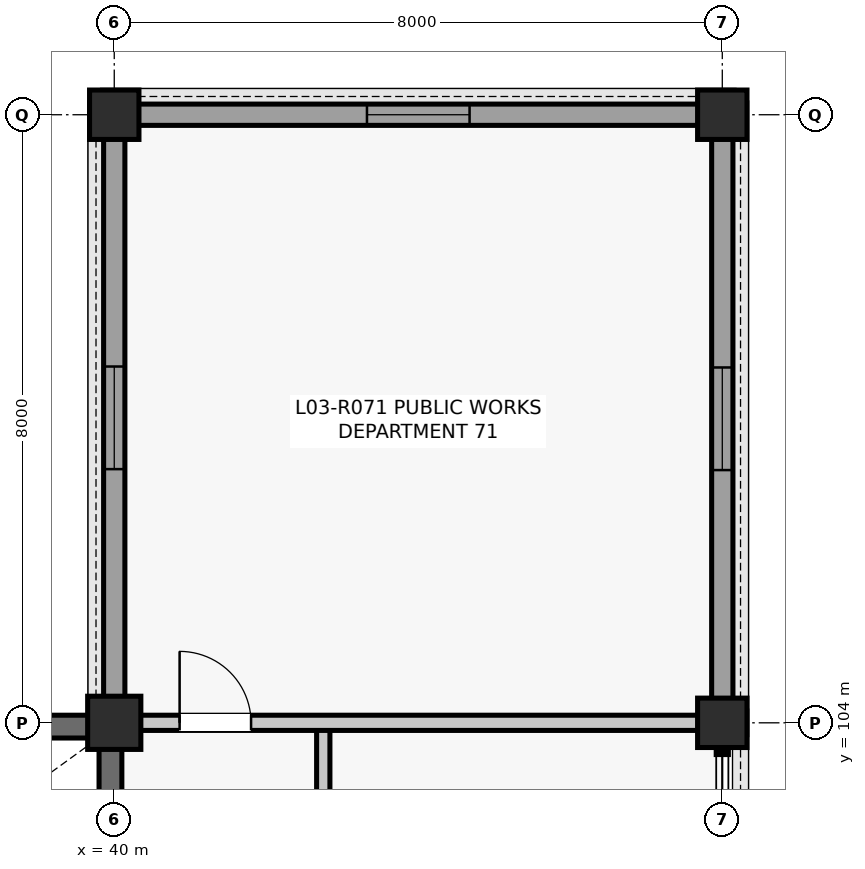
"""IFC4 building model, lengths in metres.
Left out: names, types, materials, properties, quantities, classifications, styles, units other than length and angle.
Written with IfcOpenShell. Run it as: python <this file> out.ifc"""

import sys

from ifc_helpers import new_model, si_unit, direction, frame, frame_2d, origin, origin_2d, place, context, subcontext, project, spatial, rectangle, extrude, element, fill, save


model = new_model("IFC4")
c1 = context("Model", 3, precision=1e-05, world=origin(), true_north=direction((0.0, 1.0)))
c2 = subcontext(c1, "Body", "Model", "MODEL_VIEW")
j1 = project(units=[si_unit("LENGTHUNIT", "METRE"), si_unit("PLANEANGLEUNIT", "RADIAN")], contexts=[c1])
p1 = place(None, origin())
s1 = spatial("IfcSite", under=j1, at=p1, CompositionType="ELEMENT")
p2 = place(p1, origin())
s2 = spatial("IfcBuilding", under=s1, at=p2, CompositionType="ELEMENT")
p3 = place(p2, frame((0.0, 0.0, 13.86)))
s3 = spatial("IfcBuildingStorey", under=s2, at=p3, CompositionType="ELEMENT", Elevation=13.86)
p4 = place(p3, frame((40.0, 104.0, 0.0), z_axis=(0.0, 0.0, 1.0), x_axis=(1.0, 0.0, 0.0)))
e1 = element("IfcColumn", 1, at=p4, inside=s3, PredefinedType="COLUMN", context=c2, shape_type="SweptSolid", body=[
    extrude(rectangle(XDim=0.7, YDim=0.7, at=origin_2d()), origin(), (0.0, 0.0, 1.0), 3.96),
])
for number, where, z_axis, x_axis in (
    (2, (40.0, 112.0, 0.0), (0.0, 0.0, 1.0), (1.0, 0.0, 0.0)),
    (3, (48.0, 104.0, 0.0), (0.0, 0.0, 1.0), (1.0, 0.0, 0.0)),
    (4, (48.0, 112.0, 0.0), (0.0, 0.0, 1.0), (1.0, 0.0, 0.0)),
):
    element("IfcColumn", number, at=place(p3, frame(where, z_axis=z_axis, x_axis=x_axis)), inside=s3, PredefinedType="COLUMN", context=c2, shape_type="SweptSolid", body=[
        extrude(rectangle(XDim=0.65, YDim=0.65, at=origin_2d()), origin(), (0.0, 0.0, 1.0), 3.96),
    ])
p5 = place(p3, frame((40.31, 112.0, 0.0), z_axis=(0.0, 0.0, 1.0), x_axis=(1.0, 0.0, 0.0)))
e5 = element("IfcWall", 5, at=p5, inside=s3, PredefinedType="SOLIDWALL", context=c2, shape_type="SweptSolid", body=[
    extrude(rectangle(XDim=7.38, YDim=0.28, at=frame_2d((3.69, 0.0))), origin(), (0.0, 0.0, 1.0), 3.304),
])
p6 = place(p5, frame((3.015, 0.0, 0.9)))
e6 = element("IfcOpeningElement", 6, at=p6, cuts=e5, PredefinedType="OPENING", context=c2, shape_type="SweptSolid", body=[
    extrude(rectangle(XDim=1.35, YDim=1.9, at=frame_2d((0.675, 0.95))), frame((0.0, 0.15, 0.0), z_axis=(0.0, -1.0, 0.0), x_axis=(1.0, 0.0, 0.0)), (0.0, 0.0, 1.0), 0.3),
])
p7 = place(p3, frame((40.0, 104.335, 0.0), z_axis=(0.0, 0.0, 1.0), x_axis=(0.0, 1.0, 0.0)))
e7 = element("IfcWall", 7, at=p7, inside=s3, PredefinedType="SOLIDWALL", context=c2, shape_type="SweptSolid", body=[
    extrude(rectangle(XDim=7.355, YDim=0.28, at=frame_2d((3.677, 0.0))), origin(), (0.0, 0.0, 1.0), 3.364),
])
p8 = place(p7, frame((3.002, 0.0, 0.9)))
e8 = element("IfcOpeningElement", 8, at=p8, cuts=e7, PredefinedType="OPENING", context=c2, shape_type="SweptSolid", body=[
    extrude(rectangle(XDim=1.35, YDim=1.9, at=frame_2d((0.675, 0.95))), frame((0.0, 0.15, 0.0), z_axis=(0.0, -1.0, 0.0), x_axis=(1.0, 0.0, 0.0)), (0.0, 0.0, 1.0), 0.3),
])
p9 = place(p3, frame((48.0, 104.31, 0.0), z_axis=(0.0, 0.0, 1.0), x_axis=(0.0, 1.0, 0.0)))
e9 = element("IfcWall", 9, at=p9, inside=s3, PredefinedType="SOLIDWALL", context=c2, shape_type="SweptSolid", body=[
    extrude(rectangle(XDim=7.38, YDim=0.28, at=frame_2d((3.69, 0.0))), origin(), (0.0, 0.0, 1.0), 3.304),
])
p10 = place(p9, frame((3.015, 0.0, 0.9)))
e10 = element("IfcOpeningElement", 10, at=p10, cuts=e9, PredefinedType="OPENING", context=c2, shape_type="SweptSolid", body=[
    extrude(rectangle(XDim=1.35, YDim=1.9, at=frame_2d((0.675, 0.95))), frame((0.0, 0.15, 0.0), z_axis=(0.0, -1.0, 0.0), x_axis=(1.0, 0.0, 0.0)), (0.0, 0.0, 1.0), 0.3),
])
for number, where, z_axis, x_axis in (
    (11, (32.24, 103.95, 0.0), (0.0, 0.0, 1.0), (1.0, 0.0, 0.0)),
    (12, (39.95, 96.24, 0.0), (0.0, 0.0, 1.0), (0.0, 1.0, 0.0)),
):
    element("IfcWall", number, at=place(p3, frame(where, z_axis=z_axis, x_axis=x_axis)), inside=s3, PredefinedType="SHEAR", context=c2, shape_type="SweptSolid", body=[
        extrude(rectangle(XDim=7.52, YDim=0.3, at=frame_2d((3.76, 0.0))), origin(), (0.0, 0.0, 1.0), 3.725),
    ])
p11 = place(p3, frame((42.75, 96.02, 0.0), z_axis=(0.0, 0.0, 1.0), x_axis=(0.0, 1.0, 0.0)))
e13 = element("IfcWall", 13, at=p11, inside=s3, PredefinedType="PARTITIONING", context=c2, shape_type="SweptSolid", body=[
    extrude(rectangle(XDim=7.96, YDim=0.175, at=frame_2d((3.98, 0.0))), origin(), (0.0, 0.0, 1.0), 3.241),
])
p12 = place(p11, frame((3.48, 0.0, 0.0)))
e14 = element("IfcOpeningElement", 14, at=p12, cuts=e13, PredefinedType="OPENING", context=c2, shape_type="SweptSolid", body=[
    extrude(rectangle(XDim=1.0, YDim=2.15, at=frame_2d((0.5, 1.075))), frame((0.0, 0.097, 0.0), z_axis=(0.0, -1.0, 0.0), x_axis=(1.0, 0.0, 0.0)), (0.0, 0.0, 1.0), 0.195),
])
p13 = place(p3, frame((40.34, 104.0, 0.0), z_axis=(0.0, 0.0, 1.0), x_axis=(1.0, 0.0, 0.0)))
e15 = element("IfcWall", 15, at=p13, inside=s3, PredefinedType="PARTITIONING", context=c2, shape_type="SweptSolid", body=[
    extrude(rectangle(XDim=7.345, YDim=0.2, at=frame_2d((3.672, 0.0))), origin(), (0.0, 0.0, 1.0), 3.241),
])
p14 = place(p13, frame((0.52, 0.0, 0.0)))
e16 = element("IfcOpeningElement", 16, at=p14, cuts=e15, PredefinedType="OPENING", context=c2, shape_type="SweptSolid", body=[
    extrude(rectangle(XDim=0.94, YDim=2.12, at=frame_2d((0.47, 1.06))), frame((0.0, 0.11, 0.0), z_axis=(0.0, -1.0, 0.0), x_axis=(1.0, 0.0, 0.0)), (0.0, 0.0, 1.0), 0.22),
])
p15 = place(p6, origin())
e17 = element("IfcWindow", 17, at=p15, inside=s3, PartitioningType="SINGLE_PANEL", PredefinedType="WINDOW", context=c2, shape_type="SweptSolid", body=[
    extrude(rectangle(XDim=1.35, YDim=1.9, at=frame_2d((0.675, 0.95))), frame((0.0, 0.03, 0.0), z_axis=(0.0, -1.0, 0.0), x_axis=(1.0, 0.0, 0.0)), (0.0, 0.0, 1.0), 0.06),
])
fill(e6, e17)
p16 = place(p8, origin())
e18 = element("IfcWindow", 18, at=p16, inside=s3, PartitioningType="SINGLE_PANEL", PredefinedType="WINDOW", context=c2, shape_type="SweptSolid", body=[
    extrude(rectangle(XDim=1.35, YDim=1.9, at=frame_2d((0.675, 0.95))), frame((0.0, 0.03, 0.0), z_axis=(0.0, -1.0, 0.0), x_axis=(1.0, 0.0, 0.0)), (0.0, 0.0, 1.0), 0.06),
])
fill(e8, e18)
p17 = place(p10, origin())
e19 = element("IfcWindow", 19, at=p17, inside=s3, PartitioningType="SINGLE_PANEL", PredefinedType="WINDOW", context=c2, shape_type="SweptSolid", body=[
    extrude(rectangle(XDim=1.35, YDim=1.9, at=frame_2d((0.675, 0.95))), frame((0.0, 0.03, 0.0), z_axis=(0.0, -1.0, 0.0), x_axis=(1.0, 0.0, 0.0)), (0.0, 0.0, 1.0), 0.06),
])
fill(e10, e19)
p18 = place(p14, origin())
e20 = element("IfcDoor", 20, at=p18, inside=s3, OperationType="SINGLE_SWING_LEFT", PredefinedType="DOOR", context=c2, shape_type="SweptSolid", body=[
    extrude(rectangle(XDim=0.94, YDim=2.12, at=frame_2d((0.47, 1.06))), frame((0.0, 0.025, 0.0), z_axis=(0.0, -1.0, 0.0), x_axis=(1.0, 0.0, 0.0)), (0.0, 0.0, 1.0), 0.05),
])
fill(e16, e20)
save(model, sys.argv[1])
